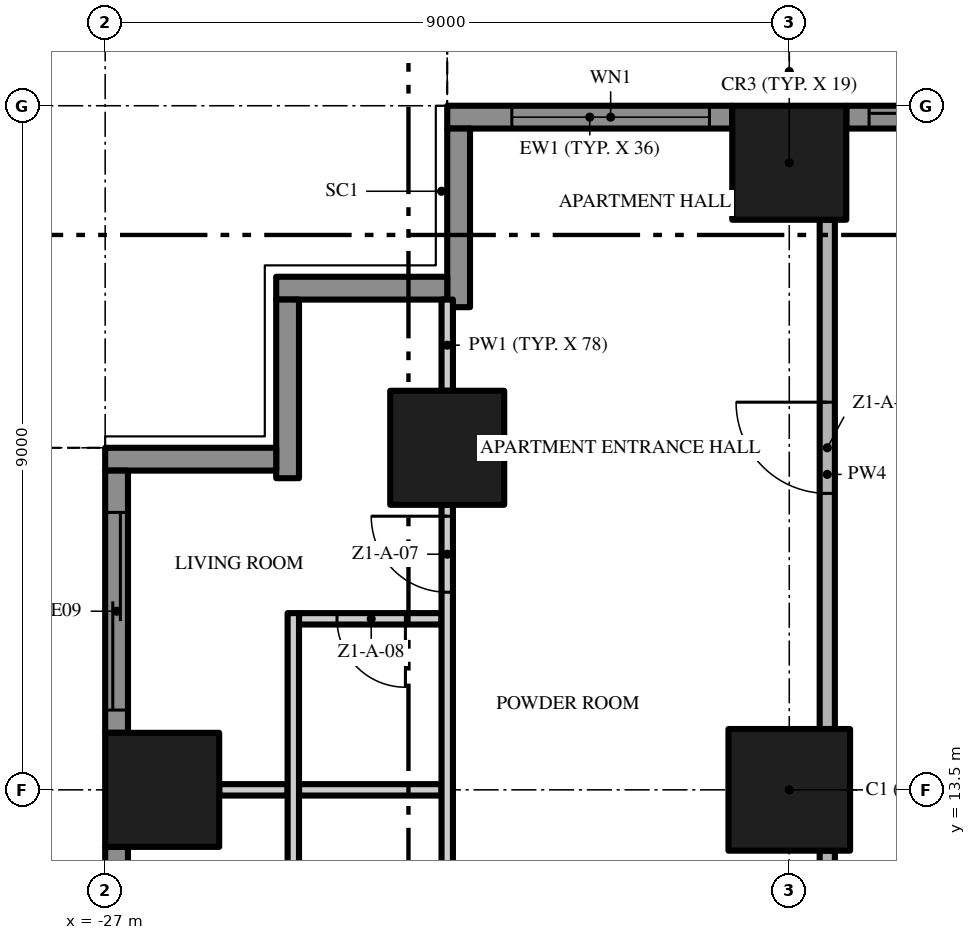
"""IFC4 building model, lengths in metres.
Left out: names, types, materials, properties, quantities, classifications, styles, units other than length and angle.
Written with IfcOpenShell. Run it as: python <this file> out.ifc"""

import sys

from ifc_helpers import new_model, si_unit, direction, frame, frame_2d, origin, origin_2d, place, context, subcontext, project, spatial, polyline, rectangle, outline, extrude, element, fill, save


model = new_model("IFC4")
c1 = context("Model", 3, precision=1e-05, world=origin(), true_north=direction((0.0, 1.0)))
c2 = subcontext(c1, "Body", "Model", "MODEL_VIEW")
j1 = project(units=[si_unit("LENGTHUNIT", "METRE"), si_unit("PLANEANGLEUNIT", "RADIAN")], contexts=[c1])
p1 = place(None, origin())
s1 = spatial("IfcSite", under=j1, at=p1, CompositionType="ELEMENT")
p2 = place(p1, origin())
s2 = spatial("IfcBuilding", under=s1, at=p2, CompositionType="ELEMENT")
p3 = place(p2, frame((0.0, 0.0, 15.0)))
s3 = spatial("IfcBuildingStorey", under=s2, at=p3, CompositionType="ELEMENT", Elevation=15.0)
p4 = place(p3, frame((-18.0, 13.5, 0.0), z_axis=(0.0, 0.0, 1.0), x_axis=(1.0, 0.0, 0.0)))
e1 = element("IfcColumn", 1, at=p4, inside=s3, PredefinedType="COLUMN", context=c2, shape_type="SweptSolid", body=[
    extrude(rectangle(XDim=1.6, YDim=1.6, at=origin_2d()), origin(), (0.0, 0.0, 1.0), 3.5),
])
for number, where, z_axis, x_axis in (
    (2, (-18.0, 21.75, 0.0), (0.0, 0.0, 1.0), (1.0, 0.0, 0.0)),
    (3, (-26.25, 13.5, 0.0), (0.0, 0.0, 1.0), (1.0, 0.0, 0.0)),
    (4, (-22.5, 18.0, 0.0), (0.0, 0.0, 1.0), (1.0, 0.0, 0.0)),
):
    element("IfcColumn", number, at=place(p3, frame(where, z_axis=z_axis, x_axis=x_axis)), inside=s3, PredefinedType="COLUMN", context=c2, shape_type="SweptSolid", body=[
        extrude(rectangle(XDim=1.5, YDim=1.5, at=origin_2d()), origin(), (0.0, 0.0, 1.0), 3.5),
    ])
p5 = place(p3, frame((-17.25, 22.35, 0.0), z_axis=(0.0, 0.0, 1.0), x_axis=(1.0, 0.0, 0.0)))
e5 = element("IfcWall", 5, at=p5, inside=s3, PredefinedType="SOLIDWALL", context=c2, shape_type="SweptSolid", body=[
    extrude(rectangle(XDim=3.75, YDim=0.3, at=frame_2d((1.875, 0.0))), origin(), (0.0, 0.0, 1.0), 3.5),
])
p6 = place(p5, frame((0.3, 0.0, 0.0)))
e6 = element("IfcOpeningElement", 6, at=p6, cuts=e5, PredefinedType="OPENING", context=c2, shape_type="SweptSolid", body=[
    extrude(rectangle(XDim=2.6, YDim=2.4, at=frame_2d((1.3, 1.2))), frame((0.0, 0.16, 0.0), z_axis=(0.0, -1.0, 0.0), x_axis=(1.0, 0.0, 0.0)), (0.0, 0.0, 1.0), 0.32),
])
p7 = place(p3, frame((-22.5, 22.35, 0.0), z_axis=(0.0, 0.0, 1.0), x_axis=(1.0, 0.0, 0.0)))
e7 = element("IfcWall", 7, at=p7, inside=s3, PredefinedType="SOLIDWALL", context=c2, shape_type="SweptSolid", body=[
    extrude(rectangle(XDim=3.75, YDim=0.3, at=frame_2d((1.875, 0.0))), origin(), (0.0, 0.0, 1.0), 3.5),
])
p8 = place(p7, frame((0.85, 0.0, 0.45)))
e8 = element("IfcOpeningElement", 8, at=p8, cuts=e7, PredefinedType="OPENING", context=c2, shape_type="SweptSolid", body=[
    extrude(rectangle(XDim=2.6, YDim=2.65, at=frame_2d((1.3, 1.325))), frame((0.0, 0.16, 0.0), z_axis=(0.0, -1.0, 0.0), x_axis=(1.0, 0.0, 0.0)), (0.0, 0.0, 1.0), 0.32),
])
p9 = place(p3, frame((-22.35, 19.85, 0.0), z_axis=(0.0, 0.0, 1.0), x_axis=(0.0, 1.0, 0.0)))
e9 = element("IfcWall", 9, at=p9, inside=s3, PredefinedType="SOLIDWALL", context=c2, shape_type="SweptSolid", body=[
    extrude(rectangle(XDim=2.35, YDim=0.3, at=frame_2d((1.175, 0.0))), origin(), (0.0, 0.0, 1.0), 3.5),
])
p10 = place(p3, frame((-24.75, 20.1, 0.0), z_axis=(0.0, 0.0, 1.0), x_axis=(1.0, 0.0, 0.0)))
e10 = element("IfcWall", 10, at=p10, inside=s3, PredefinedType="SOLIDWALL", context=c2, shape_type="SweptSolid", body=[
    extrude(rectangle(XDim=2.25, YDim=0.3, at=frame_2d((1.125, 0.0))), origin(), (0.0, 0.0, 1.0), 3.5),
])
p11 = place(p3, frame((-24.6, 17.6, 0.0), z_axis=(0.0, 0.0, 1.0), x_axis=(0.0, 1.0, 0.0)))
e11 = element("IfcWall", 11, at=p11, inside=s3, PredefinedType="SOLIDWALL", context=c2, shape_type="SweptSolid", body=[
    extrude(rectangle(XDim=2.35, YDim=0.3, at=frame_2d((1.175, 0.0))), origin(), (0.0, 0.0, 1.0), 3.5),
])
p12 = place(p3, frame((-27.0, 17.85, 0.0), z_axis=(0.0, 0.0, 1.0), x_axis=(1.0, 0.0, 0.0)))
e12 = element("IfcWall", 12, at=p12, inside=s3, PredefinedType="SOLIDWALL", context=c2, shape_type="SweptSolid", body=[
    extrude(rectangle(XDim=2.25, YDim=0.3, at=frame_2d((1.125, 0.0))), origin(), (0.0, 0.0, 1.0), 3.5),
])
p13 = place(p3, frame((-26.85, 14.25, 0.0), z_axis=(0.0, 0.0, 1.0), x_axis=(0.0, 1.0, 0.0)))
e13 = element("IfcWall", 13, at=p13, inside=s3, PredefinedType="SOLIDWALL", context=c2, shape_type="SweptSolid", body=[
    extrude(rectangle(XDim=3.45, YDim=0.3, at=frame_2d((1.725, 0.0))), origin(), (0.0, 0.0, 1.0), 3.5),
])
p14 = place(p13, frame((0.3, 0.0, 0.0)))
e14 = element("IfcOpeningElement", 14, at=p14, cuts=e13, PredefinedType="OPENING", context=c2, shape_type="SweptSolid", body=[
    extrude(rectangle(XDim=2.6, YDim=2.4, at=frame_2d((1.3, 1.2))), frame((0.0, 0.16, 0.0), z_axis=(0.0, -1.0, 0.0), x_axis=(1.0, 0.0, 0.0)), (0.0, 0.0, 1.0), 0.32),
])
p15 = place(p3, frame((-26.85, 5.25, 0.0), z_axis=(0.0, 0.0, 1.0), x_axis=(0.0, 1.0, 0.0)))
e15 = element("IfcWall", 15, at=p15, inside=s3, PredefinedType="SOLIDWALL", context=c2, shape_type="SweptSolid", body=[
    extrude(rectangle(XDim=7.5, YDim=0.3, at=frame_2d((3.75, 0.0))), origin(), (0.0, 0.0, 1.0), 3.5),
])
p16 = place(p15, frame((4.6, 0.0, 0.45)))
e16 = element("IfcOpeningElement", 16, at=p16, cuts=e15, PredefinedType="OPENING", context=c2, shape_type="SweptSolid", body=[
    extrude(rectangle(XDim=2.6, YDim=2.65, at=frame_2d((1.3, 1.325))), frame((0.0, 0.16, 0.0), z_axis=(0.0, -1.0, 0.0), x_axis=(1.0, 0.0, 0.0)), (0.0, 0.0, 1.0), 0.32),
])
p17 = place(p15, frame((0.3, 0.0, 0.45)))
e17 = element("IfcOpeningElement", 17, at=p17, cuts=e15, PredefinedType="OPENING", context=c2, shape_type="SweptSolid", body=[
    extrude(rectangle(XDim=2.6, YDim=2.65, at=frame_2d((1.3, 1.325))), frame((0.0, 0.16, 0.0), z_axis=(0.0, -1.0, 0.0), x_axis=(1.0, 0.0, 0.0)), (0.0, 0.0, 1.0), 0.32),
])
p18 = place(p3, origin())
e18 = element("IfcWall", 18, at=p18, inside=s3, PredefinedType="USERDEFINED", context=c2, shape_type="SweptSolid", body=[
    extrude(outline(polyline([(-28.8, 18.0), (-29.505, 16.5), (-29.941, 15.0), (-30.0, 14.25), (-29.941, 13.5), (-29.505, 12.0), (-28.8, 10.5), (-28.095, 9.0), (-27.659, 7.5), (-27.6, 6.75), (-27.659, 6.0), (-28.095, 4.5), (-28.8, 3.0), (-29.505, 1.5), (-29.941, 0.0), (-30.0, -0.75), (-29.941, -1.5), (-29.505, -3.0), (-28.8, -4.5), (-28.095, -6.0), (-27.659, -7.5), (-27.6, -8.25), (-27.659, -9.0), (-28.095, -10.5), (-28.8, -12.0), (-29.505, -13.5), (-29.941, -15.0), (-30.0, -15.75), (-29.941, -16.5), (-29.505, -18.0), (-29.265, -17.93), (-29.694, -16.455), (-29.749, -15.75), (-29.694, -15.045), (-29.271, -13.589), (-28.574, -12.106), (-27.86, -10.589), (-27.411, -9.045), (-27.349, -8.25), (-27.411, -7.455), (-27.86, -5.911), (-28.574, -4.394), (-29.271, -2.911), (-29.694, -1.455), (-29.749, -0.75), (-29.694, -0.045), (-29.271, 1.411), (-28.574, 2.894), (-27.86, 4.411), (-27.411, 5.955), (-27.349, 6.75), (-27.411, 7.545), (-27.86, 9.089), (-28.574, 10.606), (-29.271, 12.089), (-29.694, 13.545), (-29.749, 14.25), (-29.694, 14.955), (-29.271, 16.411), (-28.574, 17.894), (-28.8, 18.0)])), origin(), (0.0, 0.0, 1.0), 0.9),
])
p19 = place(p3, frame((-25.5, 13.5, 0.0), z_axis=(0.0, 0.0, 1.0), x_axis=(1.0, 0.0, 0.0)))
e19 = element("IfcWall", 19, at=p19, inside=s3, PredefinedType="PARTITIONING", context=c2, shape_type="SweptSolid", body=[
    extrude(rectangle(XDim=0.9, YDim=0.15, at=frame_2d((0.45, 0.0))), origin(), (0.0, 0.0, 1.0), 3.5),
])
p20 = place(p3, frame((-24.45, 13.5, 0.0), z_axis=(0.0, 0.0, 1.0), x_axis=(1.0, 0.0, 0.0)))
e20 = element("IfcWall", 20, at=p20, inside=s3, PredefinedType="PARTITIONING", context=c2, shape_type="SweptSolid", body=[
    extrude(rectangle(XDim=1.875, YDim=0.15, at=frame_2d((0.938, 0.0))), origin(), (0.0, 0.0, 1.0), 3.5),
])
p21 = place(p3, frame((-22.575, 15.75, 0.0), z_axis=(0.0, 0.0, 1.0), x_axis=(-1.0, 0.0, 0.0)))
e21 = element("IfcWall", 21, at=p21, inside=s3, PredefinedType="PARTITIONING", context=c2, shape_type="SweptSolid", body=[
    extrude(rectangle(XDim=1.875, YDim=0.15, at=frame_2d((0.938, 0.0))), origin(), (0.0, 0.0, 1.0), 3.5),
])
p22 = place(p21, frame((0.475, 0.0, 0.0)))
e22 = element("IfcOpeningElement", 22, at=p22, cuts=e21, PredefinedType="OPENING", context=c2, shape_type="SweptSolid", body=[
    extrude(rectangle(XDim=0.9, YDim=2.1, at=frame_2d((0.45, 1.05))), frame((0.0, 0.085, 0.0), z_axis=(0.0, -1.0, 0.0), x_axis=(1.0, 0.0, 0.0)), (0.0, 0.0, 1.0), 0.17),
])
p23 = place(p3, frame((-24.525, 11.175, 0.0), z_axis=(0.0, 0.0, 1.0), x_axis=(0.0, 1.0, 0.0)))
e23 = element("IfcWall", 23, at=p23, inside=s3, PredefinedType="PARTITIONING", context=c2, shape_type="SweptSolid", body=[
    extrude(rectangle(XDim=4.65, YDim=0.15, at=frame_2d((2.325, 0.0))), origin(), (0.0, 0.0, 1.0), 3.5),
])
p24 = place(p3, frame((-22.5, 0.1, 0.0), z_axis=(0.0, 0.0, 1.0), x_axis=(0.0, 1.0, 0.0)))
e24 = element("IfcWall", 24, at=p24, inside=s3, PredefinedType="PARTITIONING", context=c2, shape_type="SweptSolid", body=[
    extrude(rectangle(XDim=17.15, YDim=0.15, at=frame_2d((8.575, 0.0))), origin(), (0.0, 0.0, 1.0), 3.5),
])
p25 = place(p24, frame((1.65, 0.0, 0.0)))
e25 = element("IfcOpeningElement", 25, at=p25, cuts=e24, PredefinedType="OPENING", context=c2, shape_type="SweptSolid", body=[
    extrude(rectangle(XDim=1.0, YDim=2.4, at=frame_2d((0.5, 1.2))), frame((0.0, 0.085, 0.0), z_axis=(0.0, -1.0, 0.0), x_axis=(1.0, 0.0, 0.0)), (0.0, 0.0, 1.0), 0.17),
])
p26 = place(p24, frame((7.25, 0.0, 0.0)))
e26 = element("IfcOpeningElement", 26, at=p26, cuts=e24, PredefinedType="OPENING", context=c2, shape_type="SweptSolid", body=[
    extrude(rectangle(XDim=1.0, YDim=2.4, at=frame_2d((0.5, 1.2))), frame((0.0, 0.085, 0.0), z_axis=(0.0, -1.0, 0.0), x_axis=(1.0, 0.0, 0.0)), (0.0, 0.0, 1.0), 0.17),
])
p27 = place(p24, frame((9.5, 0.0, 0.0)))
e27 = element("IfcOpeningElement", 27, at=p27, cuts=e24, PredefinedType="OPENING", context=c2, shape_type="SweptSolid", body=[
    extrude(rectangle(XDim=1.0, YDim=2.4, at=frame_2d((0.5, 1.2))), frame((0.0, 0.085, 0.0), z_axis=(0.0, -1.0, 0.0), x_axis=(1.0, 0.0, 0.0)), (0.0, 0.0, 1.0), 0.17),
])
p28 = place(p24, frame((16.0, 0.0, 0.0)))
e28 = element("IfcOpeningElement", 28, at=p28, cuts=e24, PredefinedType="OPENING", context=c2, shape_type="SweptSolid", body=[
    extrude(rectangle(XDim=1.0, YDim=2.4, at=frame_2d((0.5, 1.2))), frame((0.0, 0.085, 0.0), z_axis=(0.0, -1.0, 0.0), x_axis=(1.0, 0.0, 0.0)), (0.0, 0.0, 1.0), 0.17),
])
p29 = place(p3, frame((-22.5, 18.75, 0.0), z_axis=(0.0, 0.0, 1.0), x_axis=(0.0, 1.0, 0.0)))
e29 = element("IfcWall", 29, at=p29, inside=s3, PredefinedType="PARTITIONING", context=c2, shape_type="SweptSolid", body=[
    extrude(rectangle(XDim=1.2, YDim=0.15, at=frame_2d((0.6, 0.0))), origin(), (0.0, 0.0, 1.0), 3.5),
])
p30 = place(p3, frame((-17.5, 5.3, 0.0), z_axis=(0.0, 0.0, 1.0), x_axis=(0.0, 1.0, 0.0)))
e30 = element("IfcWall", 30, at=p30, inside=s3, PredefinedType="PARTITIONING", context=c2, shape_type="SweptSolid", body=[
    extrude(rectangle(XDim=7.4, YDim=0.2, at=frame_2d((3.7, 0.0))), origin(), (0.0, 0.0, 1.0), 3.5),
])
p31 = place(p3, frame((-17.5, 14.3, 0.0), z_axis=(0.0, 0.0, 1.0), x_axis=(0.0, 1.0, 0.0)))
e31 = element("IfcWall", 31, at=p31, inside=s3, PredefinedType="PARTITIONING", context=c2, shape_type="SweptSolid", body=[
    extrude(rectangle(XDim=6.7, YDim=0.2, at=frame_2d((3.35, 0.0))), origin(), (0.0, 0.0, 1.0), 3.5),
])
p32 = place(p31, frame((3.1, 0.0, 0.0)))
e32 = element("IfcOpeningElement", 32, at=p32, cuts=e31, PredefinedType="OPENING", context=c2, shape_type="SweptSolid", body=[
    extrude(rectangle(XDim=1.2, YDim=2.4, at=frame_2d((0.6, 1.2))), frame((0.0, 0.11, 0.0), z_axis=(0.0, -1.0, 0.0), x_axis=(1.0, 0.0, 0.0)), (0.0, 0.0, 1.0), 0.22),
])
p33 = place(p6, origin())
e33 = element("IfcDoor", 33, at=p33, inside=s3, OperationType="SINGLE_SWING_LEFT", PredefinedType="DOOR", context=c2, shape_type="SweptSolid", body=[
    extrude(rectangle(XDim=2.6, YDim=2.4, at=frame_2d((1.3, 1.2))), frame((0.0, 0.025, 0.0), z_axis=(0.0, -1.0, 0.0), x_axis=(1.0, 0.0, 0.0)), (0.0, 0.0, 1.0), 0.05),
])
fill(e6, e33)
p34 = place(p8, origin())
e34 = element("IfcWindow", 34, at=p34, inside=s3, PartitioningType="SINGLE_PANEL", PredefinedType="WINDOW", context=c2, shape_type="SweptSolid", body=[
    extrude(rectangle(XDim=2.6, YDim=2.65, at=frame_2d((1.3, 1.325))), frame((0.0, 0.03, 0.0), z_axis=(0.0, -1.0, 0.0), x_axis=(1.0, 0.0, 0.0)), (0.0, 0.0, 1.0), 0.06),
])
fill(e8, e34)
p35 = place(p14, origin())
e35 = element("IfcDoor", 35, at=p35, inside=s3, OperationType="SINGLE_SWING_LEFT", PredefinedType="DOOR", context=c2, shape_type="SweptSolid", body=[
    extrude(rectangle(XDim=2.6, YDim=2.4, at=frame_2d((1.3, 1.2))), frame((0.0, 0.025, 0.0), z_axis=(0.0, -1.0, 0.0), x_axis=(1.0, 0.0, 0.0)), (0.0, 0.0, 1.0), 0.05),
])
fill(e14, e35)
p36 = place(p32, origin())
e36 = element("IfcDoor", 36, at=p36, inside=s3, OperationType="SINGLE_SWING_RIGHT", PredefinedType="DOOR", context=c2, shape_type="SweptSolid", body=[
    extrude(rectangle(XDim=1.2, YDim=2.4, at=frame_2d((0.6, 1.2))), frame((0.0, 0.025, 0.0), z_axis=(0.0, -1.0, 0.0), x_axis=(1.0, 0.0, 0.0)), (0.0, 0.0, 1.0), 0.05),
])
fill(e32, e36)
p37 = place(p28, origin())
e37 = element("IfcDoor", 37, at=p37, inside=s3, OperationType="SINGLE_SWING_RIGHT", PredefinedType="DOOR", context=c2, shape_type="SweptSolid", body=[
    extrude(rectangle(XDim=1.0, YDim=2.4, at=frame_2d((0.5, 1.2))), frame((0.0, 0.025, 0.0), z_axis=(0.0, -1.0, 0.0), x_axis=(1.0, 0.0, 0.0)), (0.0, 0.0, 1.0), 0.05),
])
fill(e28, e37)
p38 = place(p22, origin())
e38 = element("IfcDoor", 38, at=p38, inside=s3, OperationType="SINGLE_SWING_LEFT", PredefinedType="DOOR", context=c2, shape_type="SweptSolid", body=[
    extrude(rectangle(XDim=0.9, YDim=2.1, at=frame_2d((0.45, 1.05))), frame((0.0, 0.025, 0.0), z_axis=(0.0, -1.0, 0.0), x_axis=(1.0, 0.0, 0.0)), (0.0, 0.0, 1.0), 0.05),
])
fill(e22, e38)
save(model, sys.argv[1])
